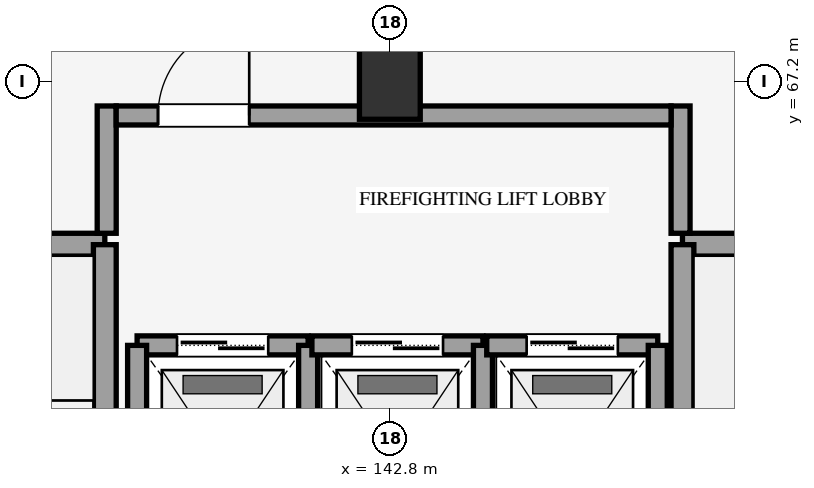
"""IFC4 building model, lengths in metres.
Left out: names, types, materials, properties, quantities, classifications, styles, units other than length and angle.
Written with IfcOpenShell. Run it as: python <this file> out.ifc"""

import sys

from ifc_helpers import new_model, si_unit, direction, frame, frame_2d, origin, origin_2d, place, context, subcontext, project, spatial, rectangle, extrude, element, fill, save


model = new_model("IFC4")
c1 = context("Model", 3, precision=1e-05, world=origin(), true_north=direction((0.0, 1.0)))
c2 = subcontext(c1, "Body", "Model", "MODEL_VIEW")
j1 = project(units=[si_unit("LENGTHUNIT", "METRE"), si_unit("PLANEANGLEUNIT", "RADIAN")], contexts=[c1])
p1 = place(None, origin())
s1 = spatial("IfcSite", under=j1, at=p1, CompositionType="ELEMENT")
p2 = place(p1, origin())
s2 = spatial("IfcBuilding", under=s1, at=p2, CompositionType="ELEMENT")
p3 = place(p2, frame((0.0, 0.0, 57.3)))
s3 = spatial("IfcBuildingStorey", under=s2, at=p3, CompositionType="ELEMENT", Elevation=57.3)
p4 = place(p3, frame((142.8, 67.2, 0.0), z_axis=(0.0, 0.0, 1.0), x_axis=(1.0, 0.0, 0.0)))
e1 = element("IfcColumn", 1, at=p4, inside=s3, PredefinedType="COLUMN", context=c2, shape_type="SweptSolid", body=[
    extrude(rectangle(XDim=0.8, YDim=1.0, at=origin_2d()), origin(), (0.0, 0.0, 1.0), 4.2),
])
p5 = place(p3, frame((135.05, 65.05, 0.0), z_axis=(0.0, 0.0, 1.0), x_axis=(1.0, 0.0, 0.0)))
e2 = element("IfcWall", 2, at=p5, inside=s3, PredefinedType="SHEAR", context=c2, shape_type="SweptSolid", body=[
    extrude(rectangle(XDim=4.0, YDim=0.3, at=frame_2d((2.0, 0.0))), origin(), (0.0, 0.0, 1.0), 4.2),
])
p6 = place(p3, frame((139.05, 50.75, 0.0), z_axis=(0.0, 0.0, 1.0), x_axis=(0.0, 1.0, 0.0)))
e3 = element("IfcWall", 3, at=p6, inside=s3, PredefinedType="SHEAR", context=c2, shape_type="SweptSolid", body=[
    extrude(rectangle(XDim=14.3, YDim=0.3, at=frame_2d((7.15, 0.0))), origin(), (0.0, 0.0, 1.0), 4.2),
])
p7 = place(p3, frame((146.65, 65.05, 0.0), z_axis=(0.0, 0.0, 1.0), x_axis=(1.0, 0.0, 0.0)))
e4 = element("IfcWall", 4, at=p7, inside=s3, PredefinedType="SHEAR", context=c2, shape_type="SweptSolid", body=[
    extrude(rectangle(XDim=4.0, YDim=0.3, at=frame_2d((2.0, 0.0))), origin(), (0.0, 0.0, 1.0), 4.2),
])
p8 = place(p3, frame((146.65, 50.75, 0.0), z_axis=(0.0, 0.0, 1.0), x_axis=(0.0, 1.0, 0.0)))
e5 = element("IfcWall", 5, at=p8, inside=s3, PredefinedType="SHEAR", context=c2, shape_type="SweptSolid", body=[
    extrude(rectangle(XDim=14.3, YDim=0.3, at=frame_2d((7.15, 0.0))), origin(), (0.0, 0.0, 1.0), 4.2),
])
p9 = place(p3, frame((139.475, 63.725, 0.0), z_axis=(0.0, 0.0, 1.0), x_axis=(1.0, 0.0, 0.0)))
e6 = element("IfcWall", 6, at=p9, inside=s3, PredefinedType="SHEAR", context=c2, shape_type="SweptSolid", body=[
    extrude(rectangle(XDim=2.25, YDim=0.25, at=frame_2d((1.125, 0.0))), origin(), (0.0, 0.0, 1.0), 3.96),
])
p10 = place(p9, frame((0.525, 0.0, 0.0)))
e7 = element("IfcOpeningElement", 7, at=p10, cuts=e6, PredefinedType="OPENING", context=c2, shape_type="SweptSolid", body=[
    extrude(rectangle(XDim=1.2, YDim=2.18, at=frame_2d((0.6, 1.09))), frame((0.0, 0.135, 0.0), z_axis=(0.0, -1.0, 0.0), x_axis=(1.0, 0.0, 0.0)), (0.0, 0.0, 1.0), 0.27),
])
for number, where, z_axis, x_axis in (
    (8, (139.475, 60.675, 0.0), (0.0, 0.0, 1.0), (0.0, 1.0, 0.0)),
    (9, (141.725, 60.675, 0.0), (0.0, 0.0, 1.0), (0.0, 1.0, 0.0)),
):
    element("IfcWall", number, at=place(p3, frame(where, z_axis=z_axis, x_axis=x_axis)), inside=s3, PredefinedType="SHEAR", context=c2, shape_type="SweptSolid", body=[
        extrude(rectangle(XDim=3.05, YDim=0.25, at=frame_2d((1.525, 0.0))), origin(), (0.0, 0.0, 1.0), 3.96),
    ])
p11 = place(p3, frame((141.775, 63.725, 0.0), z_axis=(0.0, 0.0, 1.0), x_axis=(1.0, 0.0, 0.0)))
e10 = element("IfcWall", 10, at=p11, inside=s3, PredefinedType="SHEAR", context=c2, shape_type="SweptSolid", body=[
    extrude(rectangle(XDim=2.25, YDim=0.25, at=frame_2d((1.125, 0.0))), origin(), (0.0, 0.0, 1.0), 3.96),
])
p12 = place(p11, frame((0.525, 0.0, 0.0)))
e11 = element("IfcOpeningElement", 11, at=p12, cuts=e10, PredefinedType="OPENING", context=c2, shape_type="SweptSolid", body=[
    extrude(rectangle(XDim=1.2, YDim=2.18, at=frame_2d((0.6, 1.09))), frame((0.0, 0.135, 0.0), z_axis=(0.0, -1.0, 0.0), x_axis=(1.0, 0.0, 0.0)), (0.0, 0.0, 1.0), 0.27),
])
p13 = place(p3, frame((144.025, 60.675, 0.0), z_axis=(0.0, 0.0, 1.0), x_axis=(0.0, 1.0, 0.0)))
e12 = element("IfcWall", 12, at=p13, inside=s3, PredefinedType="SHEAR", context=c2, shape_type="SweptSolid", body=[
    extrude(rectangle(XDim=3.05, YDim=0.25, at=frame_2d((1.525, 0.0))), origin(), (0.0, 0.0, 1.0), 3.96),
])
p14 = place(p3, frame((144.075, 63.725, 0.0), z_axis=(0.0, 0.0, 1.0), x_axis=(1.0, 0.0, 0.0)))
e13 = element("IfcWall", 13, at=p14, inside=s3, PredefinedType="SHEAR", context=c2, shape_type="SweptSolid", body=[
    extrude(rectangle(XDim=2.25, YDim=0.25, at=frame_2d((1.125, 0.0))), origin(), (0.0, 0.0, 1.0), 3.96),
])
p15 = place(p14, frame((0.525, 0.0, 0.0)))
e14 = element("IfcOpeningElement", 14, at=p15, cuts=e13, PredefinedType="OPENING", context=c2, shape_type="SweptSolid", body=[
    extrude(rectangle(XDim=1.2, YDim=2.18, at=frame_2d((0.6, 1.09))), frame((0.0, 0.135, 0.0), z_axis=(0.0, -1.0, 0.0), x_axis=(1.0, 0.0, 0.0)), (0.0, 0.0, 1.0), 0.27),
])
p16 = place(p3, frame((146.325, 60.675, 0.0), z_axis=(0.0, 0.0, 1.0), x_axis=(0.0, 1.0, 0.0)))
e15 = element("IfcWall", 15, at=p16, inside=s3, PredefinedType="SHEAR", context=c2, shape_type="SweptSolid", body=[
    extrude(rectangle(XDim=3.05, YDim=0.25, at=frame_2d((1.525, 0.0))), origin(), (0.0, 0.0, 1.0), 3.96),
])
for number, where, z_axis, x_axis in (
    (16, (139.075, 65.2, 0.0), (0.0, 0.0, 1.0), (0.0, 1.0, 0.0)),
    (17, (146.625, 65.2, 0.0), (0.0, 0.0, 1.0), (0.0, 1.0, 0.0)),
):
    element("IfcWall", number, at=place(p3, frame(where, z_axis=z_axis, x_axis=x_axis)), inside=s3, PredefinedType="SHEAR", context=c2, shape_type="SweptSolid", body=[
        extrude(rectangle(XDim=1.675, YDim=0.25, at=frame_2d((0.837, 0.0))), origin(), (0.0, 0.0, 1.0), 3.96),
    ])
p17 = place(p3, frame((139.2, 66.75, 0.0), z_axis=(0.0, 0.0, 1.0), x_axis=(1.0, 0.0, 0.0)))
e18 = element("IfcWall", 18, at=p17, inside=s3, PredefinedType="SHEAR", context=c2, shape_type="SweptSolid", body=[
    extrude(rectangle(XDim=7.3, YDim=0.25, at=frame_2d((3.65, 0.0))), origin(), (0.0, 0.0, 1.0), 3.96),
])
p18 = place(p17, frame((0.55, 0.0, 0.0)))
e19 = element("IfcOpeningElement", 19, at=p18, cuts=e18, PredefinedType="OPENING", context=c2, shape_type="SweptSolid", body=[
    extrude(rectangle(XDim=1.2, YDim=2.15, at=frame_2d((0.6, 1.075))), frame((0.0, 0.135, 0.0), z_axis=(0.0, -1.0, 0.0), x_axis=(1.0, 0.0, 0.0)), (0.0, 0.0, 1.0), 0.27),
])
p19 = place(p10, origin())
e20 = element("IfcDoor", 20, at=p19, inside=s3, OperationType="DOUBLE_DOOR_SLIDING", PredefinedType="DOOR", context=c2, shape_type="SweptSolid", body=[
    extrude(rectangle(XDim=1.2, YDim=2.18, at=frame_2d((0.6, 1.09))), frame((0.0, 0.025, 0.0), z_axis=(0.0, -1.0, 0.0), x_axis=(1.0, 0.0, 0.0)), (0.0, 0.0, 1.0), 0.05),
])
fill(e7, e20)
p20 = place(p12, origin())
e21 = element("IfcDoor", 21, at=p20, inside=s3, OperationType="DOUBLE_DOOR_SLIDING", PredefinedType="DOOR", context=c2, shape_type="SweptSolid", body=[
    extrude(rectangle(XDim=1.2, YDim=2.18, at=frame_2d((0.6, 1.09))), frame((0.0, 0.025, 0.0), z_axis=(0.0, -1.0, 0.0), x_axis=(1.0, 0.0, 0.0)), (0.0, 0.0, 1.0), 0.05),
])
fill(e11, e21)
p21 = place(p15, origin())
e22 = element("IfcDoor", 22, at=p21, inside=s3, OperationType="DOUBLE_DOOR_SLIDING", PredefinedType="DOOR", context=c2, shape_type="SweptSolid", body=[
    extrude(rectangle(XDim=1.2, YDim=2.18, at=frame_2d((0.6, 1.09))), frame((0.0, 0.025, 0.0), z_axis=(0.0, -1.0, 0.0), x_axis=(1.0, 0.0, 0.0)), (0.0, 0.0, 1.0), 0.05),
])
fill(e14, e22)
p22 = place(p18, origin())
e23 = element("IfcDoor", 23, at=p22, inside=s3, OperationType="SINGLE_SWING_RIGHT", PredefinedType="DOOR", context=c2, shape_type="SweptSolid", body=[
    extrude(rectangle(XDim=1.2, YDim=2.15, at=frame_2d((0.6, 1.075))), frame((0.0, 0.025, 0.0), z_axis=(0.0, -1.0, 0.0), x_axis=(1.0, 0.0, 0.0)), (0.0, 0.0, 1.0), 0.05),
])
fill(e19, e23)
save(model, sys.argv[1])
